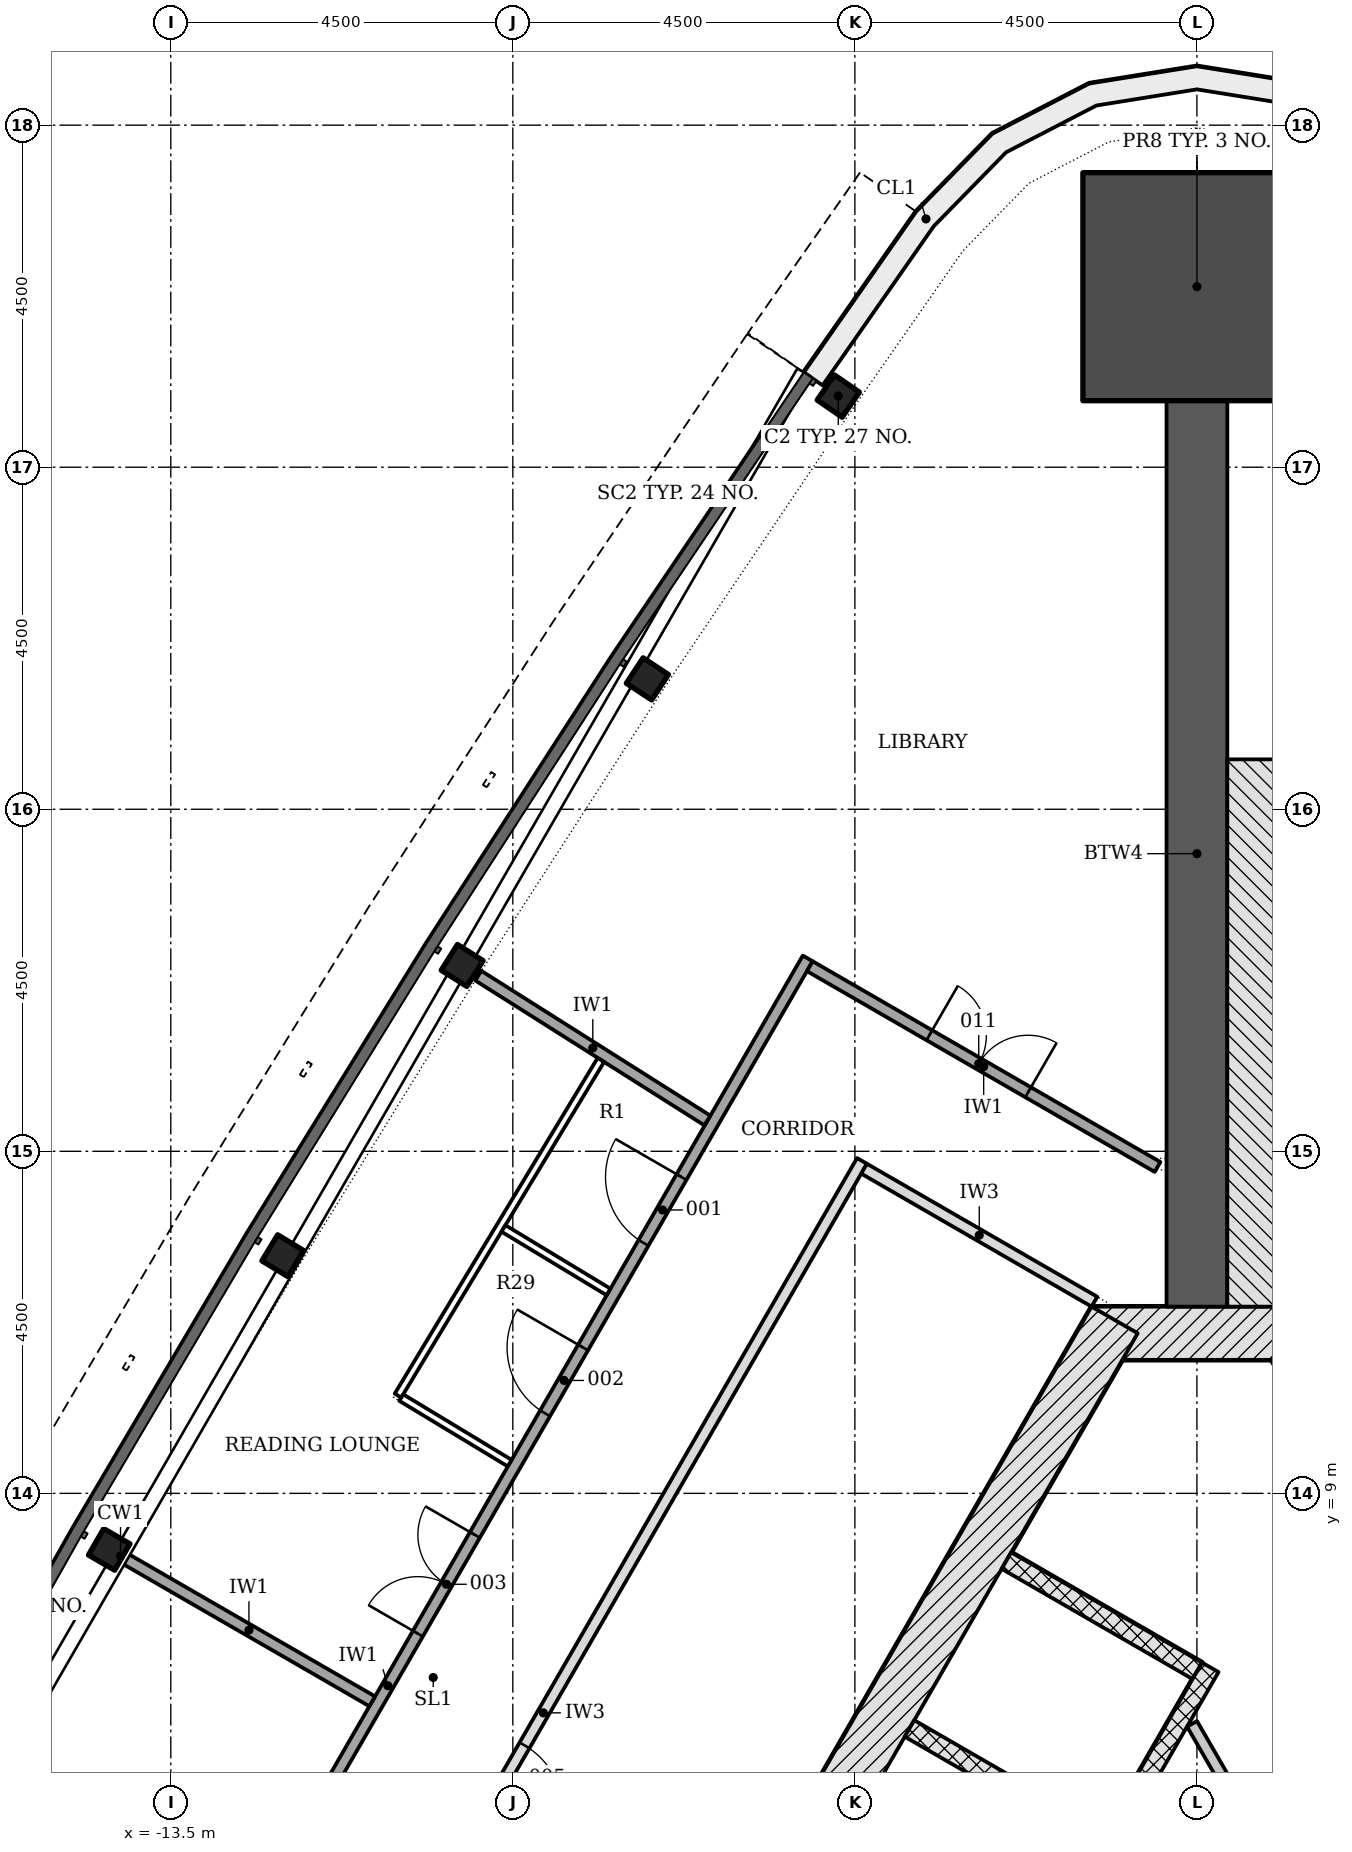
"""IFC4 building model, lengths in metres.
Left out: names, types, materials, properties, quantities, classifications, styles, units other than length and angle.
Written with IfcOpenShell. Run it as: python <this file> out.ifc"""

import sys

from ifc_helpers import new_model, si_unit, direction, frame, frame_2d, origin, origin_2d, place, context, subcontext, project, spatial, polyline, rectangle, i_section, outline, extrude, element, fill, save


model = new_model("IFC4")
c1 = context("Model", 3, precision=1e-05, world=origin(), true_north=direction((0.0, 1.0)))
c2 = subcontext(c1, "Body", "Model", "MODEL_VIEW")
j1 = project(units=[si_unit("LENGTHUNIT", "METRE"), si_unit("PLANEANGLEUNIT", "RADIAN")], contexts=[c1])
p1 = place(None, origin())
s1 = spatial("IfcSite", under=j1, at=p1, CompositionType="ELEMENT")
p2 = place(p1, origin())
s2 = spatial("IfcBuilding", under=s1, at=p2, CompositionType="ELEMENT")
p3 = place(p2, frame((0.0, 0.0, 109.5)))
s3 = spatial("IfcBuildingStorey", under=s2, at=p3, CompositionType="ELEMENT", Elevation=109.5)
p4 = place(p3, frame((10.311, -4.703, -0.2), z_axis=(0.0, 0.0, 1.0), x_axis=(-0.500001446645, 0.866024568562, 0.0)))
e1 = element("IfcWall", 1, at=p4, inside=s3, PredefinedType="SHEAR", context=c2, shape_type="SweptSolid", body=[
    extrude(rectangle(XDim=18.458, YDim=0.7, at=frame_2d((9.229, 0.0))), origin(), (0.0, 0.0, 1.0), 3.6),
])
p5 = place(p4, frame((10.5, 0.0, 0.2)))
e2 = element("IfcOpeningElement", 2, at=p5, cuts=e1, PredefinedType="OPENING", context=c2, shape_type="SweptSolid", body=[
    extrude(rectangle(XDim=1.0, YDim=2.1, at=frame_2d((0.5, 1.05))), frame((0.0, 0.36, 0.0), z_axis=(0.0, -1.0, 0.0), x_axis=(1.0, 0.0, 0.0)), (0.0, 0.0, 1.0), 0.72),
])
p6 = place(p4, frame((4.877, 0.0, 0.2)))
e3 = element("IfcOpeningElement", 3, at=p6, cuts=e1, PredefinedType="OPENING", context=c2, shape_type="SweptSolid", body=[
    extrude(rectangle(XDim=0.9, YDim=2.1, at=frame_2d((0.45, 1.05))), frame((0.0, 0.36, 0.0), z_axis=(0.0, -1.0, 0.0), x_axis=(1.0, 0.0, 0.0)), (0.0, 0.0, 1.0), 0.72),
])
p7 = place(p4, frame((14.452, 0.0, 0.2)))
e4 = element("IfcOpeningElement", 4, at=p7, cuts=e1, PredefinedType="OPENING", context=c2, shape_type="SweptSolid", body=[
    extrude(rectangle(XDim=0.9, YDim=2.1, at=frame_2d((0.45, 1.05))), frame((0.0, 0.36, 0.0), z_axis=(0.0, -1.0, 0.0), x_axis=(1.0, 0.0, 0.0)), (0.0, 0.0, 1.0), 0.72),
])
p8 = place(p3, frame((1.386, 11.106, -0.2), z_axis=(0.0, 0.0, 1.0), x_axis=(-1.0, 0.0, 0.0)))
e5 = element("IfcWall", 5, at=p8, inside=s3, PredefinedType="SHEAR", context=c2, shape_type="SweptSolid", body=[
    extrude(rectangle(XDim=2.771, YDim=0.7, at=frame_2d((1.386, 0.0))), origin(), (0.0, 0.0, 1.0), 3.6),
])
p9 = place(p3, frame((-1.083, 11.281, -0.2), z_axis=(0.0, 0.0, 1.0), x_axis=(-0.500001446645, -0.866024568562, 0.0)))
e6 = element("IfcWall", 6, at=p9, inside=s3, PredefinedType="SHEAR", context=c2, shape_type="SweptSolid", body=[
    extrude(rectangle(XDim=18.458, YDim=0.7, at=frame_2d((9.229, 0.0))), origin(), (0.0, 0.0, 1.0), 3.6),
])
p10 = place(p9, frame((8.979, 0.0, 0.2)))
e7 = element("IfcOpeningElement", 7, at=p10, cuts=e6, PredefinedType="OPENING", context=c2, shape_type="SweptSolid", body=[
    extrude(rectangle(XDim=1.2, YDim=2.1, at=frame_2d((0.6, 1.05))), frame((0.0, 0.36, 0.0), z_axis=(0.0, -1.0, 0.0), x_axis=(1.0, 0.0, 0.0)), (0.0, 0.0, 1.0), 0.72),
])
p11 = place(p9, frame((11.029, 0.0, 0.2)))
e8 = element("IfcOpeningElement", 8, at=p11, cuts=e6, PredefinedType="OPENING", context=c2, shape_type="SweptSolid", body=[
    extrude(rectangle(XDim=1.2, YDim=2.1, at=frame_2d((0.6, 1.05))), frame((0.0, 0.36, 0.0), z_axis=(0.0, -1.0, 0.0), x_axis=(1.0, 0.0, 0.0)), (0.0, 0.0, 1.0), 0.72),
])
p12 = place(p3, frame((0.0, 11.456, -0.2), z_axis=(0.0, 0.0, 1.0), x_axis=(0.0, 1.0, 0.0)))
e9 = element("IfcWall", 9, at=p12, inside=s3, PredefinedType="SHEAR", context=c2, shape_type="SweptSolid", body=[
    extrude(rectangle(XDim=11.919, YDim=0.8, at=frame_2d((5.959, 0.0))), origin(), (0.0, 0.0, 1.0), 3.6),
])
p13 = place(p3, frame((0.0, 24.875, -0.2), z_axis=(0.0, 0.0, 1.0), x_axis=(0.0, 1.0, 0.0)))
e10 = element("IfcColumn", 10, at=p13, inside=s3, PredefinedType="COLUMN", context=c2, shape_type="SweptSolid", body=[
    extrude(rectangle(XDim=3.0, YDim=3.0, at=origin_2d()), origin(), (0.0, 0.0, 1.0), 3.6),
])
for number, where, z_axis, x_axis in (
    (11, (-4.718, 23.435, -0.2), (0.0, 0.0, 1.0), (-0.568, -0.823, 0.0)),
    (12, (-7.23, 19.715, -0.2), (0.0, 0.0, 1.0), (-0.551, -0.834, 0.0)),
    (13, (-9.667, 15.945, -0.2), (0.0, 0.0, 1.0), (-0.534, -0.845, 0.0)),
    (14, (-12.027, 12.127, -0.2), (0.0, 0.0, 1.0), (-0.517, -0.856, 0.0)),
    (15, (-14.311, 8.262, -0.2), (0.0, 0.0, 1.0), (-0.5, -0.866, 0.0)),
):
    element("IfcColumn", number, at=place(p3, frame(where, z_axis=z_axis, x_axis=x_axis)), inside=s3, PredefinedType="COLUMN", context=c2, shape_type="SweptSolid", body=[
        extrude(i_section(OverallWidth=0.401, OverallDepth=0.399, WebThickness=0.025, FlangeThickness=0.04, FilletRadius=0.015, at=origin_2d()), origin(), (0.0, 0.0, 1.0), 3.6),
    ])
p14 = place(p3, origin())
e16 = element("IfcWall", 16, at=p14, inside=s3, PredefinedType="NOTDEFINED", context=c2, shape_type="SweptSolid", body=[
    extrude(outline(polyline([(5.171, 23.748), (3.694, 25.863), (2.69, 26.888), (1.417, 27.547), (0.0, 27.775), (-1.417, 27.547), (-2.69, 26.888), (-3.694, 25.863), (-5.171, 23.748), (-4.925, 23.576), (-3.462, 25.67), (-2.51, 26.644), (-1.321, 27.259), (0.0, 27.471), (1.321, 27.259), (2.51, 26.644), (3.462, 25.67), (4.925, 23.576), (5.171, 23.748)])), origin(), (0.0, 0.0, 1.0), 3.3),
])
p15 = place(p3, frame((-2.506, 8.115, -0.2), z_axis=(0.0, 0.0, 1.0), x_axis=(0.865996321171, -0.50005036918, 0.0)))
e17 = element("IfcWall", 17, at=p15, inside=s3, PredefinedType="PARTITIONING", context=c2, shape_type="SweptSolid", body=[
    extrude(rectangle(XDim=2.9, YDim=0.25, at=frame_2d((1.45, 0.0))), origin(), (0.0, 0.0, 1.0), 3.6),
])
p16 = place(p3, frame((-3.781, 5.907, -0.2), z_axis=(0.0, 0.0, 1.0), x_axis=(0.866032775405, -0.499987231761, 0.0)))
e18 = element("IfcWall", 18, at=p16, inside=s3, PredefinedType="PARTITIONING", context=c2, shape_type="SweptSolid", body=[
    extrude(rectangle(XDim=2.9, YDim=0.25, at=frame_2d((1.45, 0.0))), origin(), (0.0, 0.0, 1.0), 3.6),
])
p17 = place(p3, frame((0.176, 6.711, 0.0), z_axis=(0.0, 0.0, 1.0), x_axis=(-0.500004227369, -0.866022963098, 0.0)))
e19 = element("IfcWall", 19, at=p17, inside=s3, PredefinedType="PARTITIONING", context=c2, shape_type="SweptSolid", body=[
    extrude(rectangle(XDim=11.8, YDim=0.25, at=frame_2d((5.9, 0.0))), origin(), (0.0, 0.0, 1.0), 3.4),
])
p18 = place(p3, frame((-2.698, 1.354, 0.0), z_axis=(0.0, 0.0, 1.0), x_axis=(0.866021157486, 0.500007354732, 0.0)))
e20 = element("IfcWall", 20, at=p18, inside=s3, PredefinedType="PARTITIONING", context=c2, shape_type="SweptSolid", body=[
    extrude(rectangle(XDim=7.888, YDim=0.15, at=frame_2d((3.944, 0.0))), origin(), (0.0, 0.0, 1.0), 3.4),
])
p19 = place(p18, frame((1.845, 0.0, 0.0)))
e21 = element("IfcOpeningElement", 21, at=p19, cuts=e20, PredefinedType="OPENING", context=c2, shape_type="SweptSolid", body=[
    extrude(rectangle(XDim=0.9, YDim=2.1, at=frame_2d((0.45, 1.05))), frame((0.0, 0.085, 0.0), z_axis=(0.0, -1.0, 0.0), x_axis=(1.0, 0.0, 0.0)), (0.0, 0.0, 1.0), 0.17),
])
p20 = place(p3, frame((1.088, 3.972, 0.0), z_axis=(0.0, 0.0, 1.0), x_axis=(-0.500116913307, 0.865957893332, 0.0)))
e22 = element("IfcWall", 22, at=p20, inside=s3, PredefinedType="PARTITIONING", context=c2, shape_type="SweptSolid", body=[
    extrude(rectangle(XDim=2.304, YDim=0.15, at=frame_2d((1.152, 0.0))), origin(), (0.0, 0.0, 1.0), 3.4),
])
p21 = place(p3, frame((0.993, 11.456, -0.2), z_axis=(0.0, 0.0, 1.0), x_axis=(0.0, 1.0, 0.0)))
e23 = element("IfcWall", 23, at=p21, inside=s3, PredefinedType="SHEAR", context=c2, shape_type="SweptSolid", body=[
    extrude(rectangle(XDim=7.2, YDim=1.186, at=frame_2d((3.6, 0.0))), origin(), (0.0, 0.0, 1.0), 3.6),
])
p22 = place(p3, frame((-16.169, -3.099, 0.0), z_axis=(0.0, 0.0, 1.0), x_axis=(0.499999805269, 0.866025516212, 0.0)))
e24 = element("IfcWall", 24, at=p22, inside=s3, PredefinedType="PARTITIONING", context=c2, shape_type="SweptSolid", body=[
    extrude(rectangle(XDim=22.097, YDim=0.15, at=frame_2d((11.049, 0.0))), origin(), (0.0, 0.0, 1.0), 2.847),
])
p23 = place(p22, frame((17.776, 0.0, 0.0)))
e25 = element("IfcOpeningElement", 25, at=p23, cuts=e24, PredefinedType="OPENING", context=c2, shape_type="SweptSolid", body=[
    extrude(rectangle(XDim=1.0, YDim=2.1, at=frame_2d((0.5, 1.05))), frame((0.0, 0.085, 0.0), z_axis=(0.0, -1.0, 0.0), x_axis=(1.0, 0.0, 0.0)), (0.0, 0.0, 1.0), 0.17),
])
p24 = place(p22, frame((15.186, 0.0, 0.0)))
e26 = element("IfcOpeningElement", 26, at=p24, cuts=e24, PredefinedType="OPENING", context=c2, shape_type="SweptSolid", body=[
    extrude(rectangle(XDim=1.0, YDim=2.1, at=frame_2d((0.5, 1.05))), frame((0.0, 0.085, 0.0), z_axis=(0.0, -1.0, 0.0), x_axis=(1.0, 0.0, 0.0)), (0.0, 0.0, 1.0), 0.17),
])
p25 = place(p22, frame((11.84, 0.0, 0.0)))
e27 = element("IfcOpeningElement", 27, at=p25, cuts=e24, PredefinedType="OPENING", context=c2, shape_type="SweptSolid", body=[
    extrude(rectangle(XDim=1.5, YDim=2.1, at=frame_2d((0.75, 1.05))), frame((0.0, 0.085, 0.0), z_axis=(0.0, -1.0, 0.0), x_axis=(1.0, 0.0, 0.0)), (0.0, 0.0, 1.0), 0.17),
])
p26 = place(p22, frame((4.503, 0.0, 0.0)))
e28 = element("IfcOpeningElement", 28, at=p26, cuts=e24, PredefinedType="OPENING", context=c2, shape_type="SweptSolid", body=[
    extrude(rectangle(XDim=1.5, YDim=2.1, at=frame_2d((0.75, 1.05))), frame((0.0, 0.085, 0.0), z_axis=(0.0, -1.0, 0.0), x_axis=(1.0, 0.0, 0.0)), (0.0, 0.0, 1.0), 0.17),
])
p27 = place(p3, frame((-4.407, 13.374, 0.0), z_axis=(0.0, 0.0, 1.0), x_axis=(-0.499997181693, -0.866027030928, 0.0)))
e29 = element("IfcWall", 29, at=p27, inside=s3, PredefinedType="PARTITIONING", context=c2, shape_type="SweptSolid", body=[
    extrude(rectangle(XDim=16.77, YDim=0.15, at=frame_2d((8.385, 0.0))), origin(), (0.0, 0.0, 1.0), 2.847),
])
p28 = place(p27, frame((8.879, 0.0, 0.0)))
e30 = element("IfcOpeningElement", 30, at=p28, cuts=e29, PredefinedType="OPENING", context=c2, shape_type="SweptSolid", body=[
    extrude(rectangle(XDim=1.0, YDim=2.1, at=frame_2d((0.5, 1.05))), frame((0.0, 0.085, 0.0), z_axis=(0.0, -1.0, 0.0), x_axis=(1.0, 0.0, 0.0)), (0.0, 0.0, 1.0), 0.17),
])
p29 = place(p3, frame((-5.093, 15.935, 0.0), z_axis=(0.0, 0.0, 1.0), x_axis=(0.866033195618, -0.499986503906, 0.0)))
e31 = element("IfcWall", 31, at=p29, inside=s3, PredefinedType="PARTITIONING", context=c2, shape_type="SweptSolid", body=[
    extrude(rectangle(XDim=5.282, YDim=0.15, at=frame_2d((2.641, 0.0))), origin(), (0.0, 0.0, 1.0), 3.4),
])
p30 = place(p29, frame((1.816, 0.0, 0.0)))
e32 = element("IfcOpeningElement", 32, at=p30, cuts=e31, PredefinedType="OPENING", context=c2, shape_type="SweptSolid", body=[
    extrude(rectangle(XDim=1.5, YDim=2.1, at=frame_2d((0.75, 1.05))), frame((0.0, 0.085, 0.0), z_axis=(0.0, -1.0, 0.0), x_axis=(1.0, 0.0, 0.0)), (0.0, 0.0, 1.0), 0.17),
])
p31 = place(p3, frame((-4.379, 13.271, 0.0), z_axis=(0.0, 0.0, 1.0), x_axis=(0.866019471182, -0.500010275428, 0.0)))
e33 = element("IfcWall", 33, at=p31, inside=s3, PredefinedType="PARTITIONING", context=c2, shape_type="SweptSolid", body=[
    extrude(rectangle(XDim=3.5, YDim=0.15, at=frame_2d((1.75, 0.0))), origin(), (0.0, 0.0, 1.0), 3.4),
])
p32 = place(p3, frame((-14.094, 8.137, 0.0), z_axis=(0.0, 0.0, 1.0), x_axis=(0.866036909293, -0.499980071345, 0.0)))
e34 = element("IfcWall", 34, at=p32, inside=s3, PredefinedType="PARTITIONING", context=c2, shape_type="SweptSolid", body=[
    extrude(rectangle(XDim=3.746, YDim=0.15, at=frame_2d((1.873, 0.0))), origin(), (0.0, 0.0, 1.0), 2.847),
])
p33 = place(p3, frame((-9.455, 15.812, 0.0), z_axis=(0.0, 0.0, 1.0), x_axis=(0.845256180865, -0.53436129043, 0.0)))
e35 = element("IfcWall", 35, at=p33, inside=s3, PredefinedType="PARTITIONING", context=c2, shape_type="SweptSolid", body=[
    extrude(rectangle(XDim=3.566, YDim=0.15, at=frame_2d((1.783, 0.0))), origin(), (0.0, 0.0, 1.0), 2.847),
])
p34 = place(p3, frame((-7.842, 14.702, 0.0), z_axis=(0.0, 0.0, 1.0), x_axis=(-0.517269453202, -0.855822594224, 0.0)))
e36 = element("IfcWall", 36, at=p34, inside=s3, PredefinedType="PARTITIONING", context=c2, shape_type="SweptSolid", body=[
    extrude(rectangle(XDim=5.16, YDim=0.1, at=frame_2d((2.58, 0.0))), origin(), (0.0, 0.0, 1.0), 2.847),
])
p35 = place(p3, frame((-10.468, 10.26, 0.0), z_axis=(0.0, 0.0, 1.0), x_axis=(0.855795319679, -0.517314576264, 0.0)))
e37 = element("IfcWall", 37, at=p35, inside=s3, PredefinedType="PARTITIONING", context=c2, shape_type="SweptSolid", body=[
    extrude(rectangle(XDim=1.667, YDim=0.1, at=frame_2d((0.833, 0.0))), origin(), (0.0, 0.0, 1.0), 3.4),
])
p36 = place(p3, frame((-9.123, 12.485, 0.0), z_axis=(0.0, 0.0, 1.0), x_axis=(0.855820717892, -0.517272557581, 0.0)))
e38 = element("IfcWall", 38, at=p36, inside=s3, PredefinedType="PARTITIONING", context=c2, shape_type="SweptSolid", body=[
    extrude(rectangle(XDim=1.615, YDim=0.1, at=frame_2d((0.807, 0.0))), origin(), (0.0, 0.0, 1.0), 3.4),
])
p37 = place(p23, origin())
e39 = element("IfcDoor", 39, at=p37, inside=s3, OperationType="SINGLE_SWING_RIGHT", PredefinedType="DOOR", context=c2, shape_type="SweptSolid", body=[
    extrude(rectangle(XDim=1.0, YDim=2.1, at=frame_2d((0.5, 1.05))), frame((0.0, 0.025, 0.0), z_axis=(0.0, -1.0, 0.0), x_axis=(1.0, 0.0, 0.0)), (0.0, 0.0, 1.0), 0.05),
])
fill(e25, e39)
p38 = place(p24, origin())
e40 = element("IfcDoor", 40, at=p38, inside=s3, OperationType="SINGLE_SWING_RIGHT", PredefinedType="DOOR", context=c2, shape_type="SweptSolid", body=[
    extrude(rectangle(XDim=1.0, YDim=2.1, at=frame_2d((0.5, 1.05))), frame((0.0, 0.025, 0.0), z_axis=(0.0, -1.0, 0.0), x_axis=(1.0, 0.0, 0.0)), (0.0, 0.0, 1.0), 0.05),
])
fill(e26, e40)
p39 = place(p25, origin())
e41 = element("IfcDoor", 41, at=p39, inside=s3, OperationType="DOUBLE_DOOR_SINGLE_SWING", PredefinedType="DOOR", context=c2, shape_type="SweptSolid", body=[
    extrude(rectangle(XDim=1.5, YDim=2.1, at=frame_2d((0.75, 1.05))), frame((0.0, 0.025, 0.0), z_axis=(0.0, -1.0, 0.0), x_axis=(1.0, 0.0, 0.0)), (0.0, 0.0, 1.0), 0.05),
])
fill(e27, e41)
p40 = place(p28, origin())
e42 = element("IfcDoor", 42, at=p40, inside=s3, OperationType="SINGLE_SWING_RIGHT", PredefinedType="DOOR", context=c2, shape_type="SweptSolid", body=[
    extrude(rectangle(XDim=1.0, YDim=2.1, at=frame_2d((0.5, 1.05))), frame((0.0, 0.025, 0.0), z_axis=(0.0, -1.0, 0.0), x_axis=(1.0, 0.0, 0.0)), (0.0, 0.0, 1.0), 0.05),
])
fill(e30, e42)
p41 = place(p30, origin())
e43 = element("IfcDoor", 43, at=p41, inside=s3, OperationType="DOUBLE_DOOR_SINGLE_SWING", PredefinedType="DOOR", context=c2, shape_type="SweptSolid", body=[
    extrude(rectangle(XDim=1.5, YDim=2.1, at=frame_2d((0.75, 1.05))), frame((0.0, 0.025, 0.0), z_axis=(0.0, -1.0, 0.0), x_axis=(1.0, 0.0, 0.0)), (0.0, 0.0, 1.0), 0.05),
])
fill(e32, e43)
save(model, sys.argv[1])
